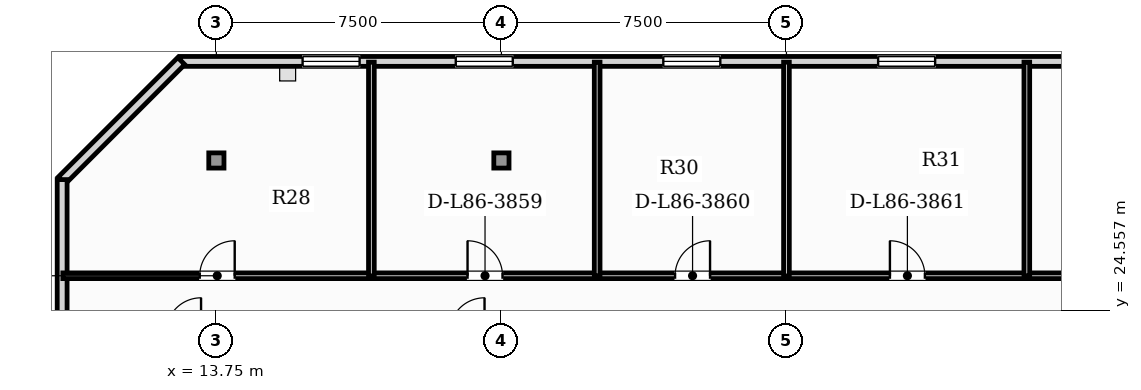
"""IFC4 building model, lengths in metres.
Left out: names, types, materials, properties, quantities, classifications, styles, units other than length and angle.
Written with IfcOpenShell. Run it as: python <this file> out.ifc"""

import sys

from ifc_helpers import new_model, si_unit, direction, frame, frame_2d, origin, origin_2d, place, context, subcontext, project, spatial, rectangle, hollow_rectangle, extrude, element, fill, save


model = new_model("IFC4")
c1 = context("Model", 3, precision=1e-05, world=origin(), true_north=direction((0.0, 1.0)))
c2 = subcontext(c1, "Body", "Model", "MODEL_VIEW")
j1 = project(units=[si_unit("LENGTHUNIT", "METRE"), si_unit("PLANEANGLEUNIT", "RADIAN")], contexts=[c1])
p1 = place(None, origin())
s1 = spatial("IfcSite", under=j1, at=p1, CompositionType="ELEMENT")
p2 = place(p1, origin())
s2 = spatial("IfcBuilding", under=s1, at=p2, CompositionType="ELEMENT")
p3 = place(p2, frame((0.0, 0.0, 349.05)))
s3 = spatial("IfcBuildingStorey", under=s2, at=p3, CompositionType="ELEMENT", Elevation=349.05)
for number, where, z_axis, x_axis in (
    (1, (13.75, 28.5, 0.0), (0.0, 0.0, 1.0), (1.0, 0.0, 0.0)),
    (2, (21.25, 28.5, 0.0), (0.0, 0.0, 1.0), (1.0, 0.0, 0.0)),
):
    element("IfcColumn", number, at=place(p3, frame(where, z_axis=z_axis, x_axis=x_axis)), inside=s3, PredefinedType="COLUMN", context=c2, shape_type="SweptSolid", body=[
        extrude(hollow_rectangle(XDim=0.4, YDim=0.4, WallThickness=0.02, at=origin_2d()), origin(), (0.0, 0.0, 1.0), 4.4),
    ])
p4 = place(p3, frame((44.698, 31.107, 0.0), z_axis=(0.0, 0.0, 1.0), x_axis=(-1.0, 0.0, 0.0)))
e3 = element("IfcWall", 3, at=p4, inside=s3, PredefinedType="SOLIDWALL", context=c2, shape_type="SweptSolid", body=[
    extrude(rectangle(XDim=31.896, YDim=0.26, at=frame_2d((15.948, 0.0))), origin(), (0.0, 0.0, 1.0), 4.14),
])
p5 = place(p4, frame((27.179, 0.0, 0.9)))
e4 = element("IfcOpeningElement", 4, at=p5, cuts=e3, PredefinedType="OPENING", context=c2, shape_type="SweptSolid", body=[
    extrude(rectangle(XDim=1.5, YDim=1.95, at=frame_2d((0.75, 0.975))), frame((0.0, 0.14, 0.0), z_axis=(0.0, -1.0, 0.0), x_axis=(1.0, 0.0, 0.0)), (0.0, 0.0, 1.0), 0.28),
])
p6 = place(p4, frame((23.149, 0.0, 0.9)))
e5 = element("IfcOpeningElement", 5, at=p6, cuts=e3, PredefinedType="OPENING", context=c2, shape_type="SweptSolid", body=[
    extrude(rectangle(XDim=1.5, YDim=1.95, at=frame_2d((0.75, 0.975))), frame((0.0, 0.14, 0.0), z_axis=(0.0, -1.0, 0.0), x_axis=(1.0, 0.0, 0.0)), (0.0, 0.0, 1.0), 0.28),
])
p7 = place(p4, frame((17.689, 0.0, 0.9)))
e6 = element("IfcOpeningElement", 6, at=p7, cuts=e3, PredefinedType="OPENING", context=c2, shape_type="SweptSolid", body=[
    extrude(rectangle(XDim=1.5, YDim=1.95, at=frame_2d((0.75, 0.975))), frame((0.0, 0.14, 0.0), z_axis=(0.0, -1.0, 0.0), x_axis=(1.0, 0.0, 0.0)), (0.0, 0.0, 1.0), 0.28),
])
p8 = place(p4, frame((12.036, 0.0, 0.9)))
e7 = element("IfcOpeningElement", 7, at=p8, cuts=e3, PredefinedType="OPENING", context=c2, shape_type="SweptSolid", body=[
    extrude(rectangle(XDim=1.5, YDim=1.95, at=frame_2d((0.75, 0.975))), frame((0.0, 0.14, 0.0), z_axis=(0.0, -1.0, 0.0), x_axis=(1.0, 0.0, 0.0)), (0.0, 0.0, 1.0), 0.28),
])
p9 = place(p4, frame((5.903, 0.0, 0.9)))
e8 = element("IfcOpeningElement", 8, at=p9, cuts=e3, PredefinedType="OPENING", context=c2, shape_type="SweptSolid", body=[
    extrude(rectangle(XDim=1.5, YDim=1.95, at=frame_2d((0.75, 0.975))), frame((0.0, 0.14, 0.0), z_axis=(0.0, -1.0, 0.0), x_axis=(1.0, 0.0, 0.0)), (0.0, 0.0, 1.0), 0.28),
])
p10 = place(p3, frame((12.825, 31.117, 0.0), z_axis=(0.0, 0.0, 1.0), x_axis=(-0.707106781187, -0.707106781187, 0.0)))
e9 = element("IfcWall", 9, at=p10, inside=s3, PredefinedType="SOLIDWALL", context=c2, shape_type="SweptSolid", body=[
    extrude(rectangle(XDim=4.445, YDim=0.26, at=frame_2d((2.223, 0.0))), origin(), (0.0, 0.0, 1.0), 4.14),
])
p11 = place(p3, frame((9.692, 27.997, 0.0), z_axis=(0.0, 0.0, 1.0), x_axis=(0.0, -1.0, 0.0)))
e10 = element("IfcWall", 10, at=p11, inside=s3, PredefinedType="SOLIDWALL", context=c2, shape_type="SweptSolid", body=[
    extrude(rectangle(XDim=24.757, YDim=0.26, at=frame_2d((12.378, 0.0))), origin(), (0.0, 0.0, 1.0), 4.14),
])
p12 = place(p11, frame((18.707, 0.0, 0.85)))
e11 = element("IfcOpeningElement", 11, at=p12, cuts=e10, PredefinedType="OPENING", context=c2, shape_type="SweptSolid", body=[
    extrude(rectangle(XDim=2.4, YDim=2.0, at=frame_2d((1.2, 1.0))), frame((0.0, 0.14, 0.0), z_axis=(0.0, -1.0, 0.0), x_axis=(1.0, 0.0, 0.0)), (0.0, 0.0, 1.0), 0.28),
])
p13 = place(p11, frame((10.273, 0.0, 0.9)))
e12 = element("IfcOpeningElement", 12, at=p13, cuts=e10, PredefinedType="OPENING", context=c2, shape_type="SweptSolid", body=[
    extrude(rectangle(XDim=1.5, YDim=1.95, at=frame_2d((0.75, 0.975))), frame((0.0, 0.14, 0.0), z_axis=(0.0, -1.0, 0.0), x_axis=(1.0, 0.0, 0.0)), (0.0, 0.0, 1.0), 0.28),
])
p14 = place(p11, frame((5.8, 0.0, 0.9)))
e13 = element("IfcOpeningElement", 13, at=p14, cuts=e10, PredefinedType="OPENING", context=c2, shape_type="SweptSolid", body=[
    extrude(rectangle(XDim=1.5, YDim=1.95, at=frame_2d((0.75, 0.975))), frame((0.0, 0.14, 0.0), z_axis=(0.0, -1.0, 0.0), x_axis=(1.0, 0.0, 0.0)), (0.0, 0.0, 1.0), 0.28),
])
p15 = place(p3, frame((9.711, 25.467, 0.0), z_axis=(0.0, 0.0, 1.0), x_axis=(1.0, 0.0, 0.0)))
e14 = element("IfcWall", 14, at=p15, inside=s3, PredefinedType="PARTITIONING", context=c2, shape_type="SweptSolid", body=[
    extrude(rectangle(XDim=8.122, YDim=0.15, at=frame_2d((4.061, 0.0))), origin(), (0.0, 0.0, 1.0), 4.14),
])
p16 = place(p15, frame((3.601, 0.0, 0.0)))
e15 = element("IfcOpeningElement", 15, at=p16, cuts=e14, PredefinedType="OPENING", context=c2, shape_type="SweptSolid", body=[
    extrude(rectangle(XDim=0.92, YDim=2.1, at=frame_2d((0.46, 1.05))), frame((0.0, 0.085, 0.0), z_axis=(0.0, -1.0, 0.0), x_axis=(1.0, 0.0, 0.0)), (0.0, 0.0, 1.0), 0.17),
])
p17 = place(p3, frame((17.864, 25.467, 0.0), z_axis=(0.0, 0.0, 1.0), x_axis=(1.0, 0.0, 0.0)))
e16 = element("IfcWall", 16, at=p17, inside=s3, PredefinedType="PARTITIONING", context=c2, shape_type="SweptSolid", body=[
    extrude(rectangle(XDim=5.911, YDim=0.15, at=frame_2d((2.956, 0.0))), origin(), (0.0, 0.0, 1.0), 4.14),
])
p18 = place(p17, frame((2.495, 0.0, 0.0)))
e17 = element("IfcOpeningElement", 17, at=p18, cuts=e16, PredefinedType="OPENING", context=c2, shape_type="SweptSolid", body=[
    extrude(rectangle(XDim=0.92, YDim=2.1, at=frame_2d((0.46, 1.05))), frame((0.0, 0.085, 0.0), z_axis=(0.0, -1.0, 0.0), x_axis=(1.0, 0.0, 0.0)), (0.0, 0.0, 1.0), 0.17),
])
p19 = place(p3, frame((23.804, 25.467, 0.0), z_axis=(0.0, 0.0, 1.0), x_axis=(1.0, 0.0, 0.0)))
e18 = element("IfcWall", 18, at=p19, inside=s3, PredefinedType="PARTITIONING", context=c2, shape_type="SweptSolid", body=[
    extrude(rectangle(XDim=4.951, YDim=0.15, at=frame_2d((2.475, 0.0))), origin(), (0.0, 0.0, 1.0), 4.14),
])
p20 = place(p19, frame((2.015, 0.0, 0.0)))
e19 = element("IfcOpeningElement", 19, at=p20, cuts=e18, PredefinedType="OPENING", context=c2, shape_type="SweptSolid", body=[
    extrude(rectangle(XDim=0.92, YDim=2.1, at=frame_2d((0.46, 1.05))), frame((0.0, 0.085, 0.0), z_axis=(0.0, -1.0, 0.0), x_axis=(1.0, 0.0, 0.0)), (0.0, 0.0, 1.0), 0.17),
])
p21 = place(p3, frame((28.785, 25.467, 0.0), z_axis=(0.0, 0.0, 1.0), x_axis=(1.0, 0.0, 0.0)))
e20 = element("IfcWall", 20, at=p21, inside=s3, PredefinedType="PARTITIONING", context=c2, shape_type="SweptSolid", body=[
    extrude(rectangle(XDim=6.295, YDim=0.15, at=frame_2d((3.147, 0.0))), origin(), (0.0, 0.0, 1.0), 4.14),
])
p22 = place(p21, frame((2.688, 0.0, 0.0)))
e21 = element("IfcOpeningElement", 21, at=p22, cuts=e20, PredefinedType="OPENING", context=c2, shape_type="SweptSolid", body=[
    extrude(rectangle(XDim=0.92, YDim=2.1, at=frame_2d((0.46, 1.05))), frame((0.0, 0.085, 0.0), z_axis=(0.0, -1.0, 0.0), x_axis=(1.0, 0.0, 0.0)), (0.0, 0.0, 1.0), 0.17),
])
p23 = place(p3, frame((35.11, 25.467, 0.0), z_axis=(0.0, 0.0, 1.0), x_axis=(1.0, 0.0, 0.0)))
e22 = element("IfcWall", 22, at=p23, inside=s3, PredefinedType="PARTITIONING", context=c2, shape_type="SweptSolid", body=[
    extrude(rectangle(XDim=5.911, YDim=0.15, at=frame_2d((2.955, 0.0))), origin(), (0.0, 0.0, 1.0), 4.14),
])
p24 = place(p23, frame((2.495, 0.0, 0.0)))
e23 = element("IfcOpeningElement", 23, at=p24, cuts=e22, PredefinedType="OPENING", context=c2, shape_type="SweptSolid", body=[
    extrude(rectangle(XDim=0.92, YDim=2.1, at=frame_2d((0.46, 1.05))), frame((0.0, 0.085, 0.0), z_axis=(0.0, -1.0, 0.0), x_axis=(1.0, 0.0, 0.0)), (0.0, 0.0, 1.0), 0.17),
])
for number, where, z_axis, x_axis in (
    (24, (17.829, 25.462, 0.0), (0.0, 0.0, 1.0), (0.0, 1.0, 0.0)),
    (25, (23.769, 25.462, 0.0), (0.0, 0.0, 1.0), (0.0, 1.0, 0.0)),
    (26, (28.75, 25.462, 0.0), (0.0, 0.0, 1.0), (0.0, 1.0, 0.0)),
    (27, (35.075, 25.462, 0.0), (0.0, 0.0, 1.0), (0.0, 1.0, 0.0)),
):
    element("IfcWall", number, at=place(p3, frame(where, z_axis=z_axis, x_axis=x_axis)), inside=s3, PredefinedType="PARTITIONING", context=c2, shape_type="SweptSolid", body=[
        extrude(rectangle(XDim=5.625, YDim=0.15, at=frame_2d((2.813, 0.0))), origin(), (0.0, 0.0, 1.0), 4.14),
    ])
p25 = place(p5, origin())
e28 = element("IfcWindow", 28, at=p25, inside=s3, PartitioningType="SINGLE_PANEL", PredefinedType="WINDOW", context=c2, shape_type="SweptSolid", body=[
    extrude(rectangle(XDim=1.5, YDim=1.95, at=frame_2d((0.75, 0.975))), frame((0.0, 0.03, 0.0), z_axis=(0.0, -1.0, 0.0), x_axis=(1.0, 0.0, 0.0)), (0.0, 0.0, 1.0), 0.06),
])
fill(e4, e28)
p26 = place(p6, origin())
e29 = element("IfcWindow", 29, at=p26, inside=s3, PartitioningType="SINGLE_PANEL", PredefinedType="WINDOW", context=c2, shape_type="SweptSolid", body=[
    extrude(rectangle(XDim=1.5, YDim=1.95, at=frame_2d((0.75, 0.975))), frame((0.0, 0.03, 0.0), z_axis=(0.0, -1.0, 0.0), x_axis=(1.0, 0.0, 0.0)), (0.0, 0.0, 1.0), 0.06),
])
fill(e5, e29)
p27 = place(p7, origin())
e30 = element("IfcWindow", 30, at=p27, inside=s3, PartitioningType="SINGLE_PANEL", PredefinedType="WINDOW", context=c2, shape_type="SweptSolid", body=[
    extrude(rectangle(XDim=1.5, YDim=1.95, at=frame_2d((0.75, 0.975))), frame((0.0, 0.03, 0.0), z_axis=(0.0, -1.0, 0.0), x_axis=(1.0, 0.0, 0.0)), (0.0, 0.0, 1.0), 0.06),
])
fill(e6, e30)
p28 = place(p8, origin())
e31 = element("IfcWindow", 31, at=p28, inside=s3, PartitioningType="SINGLE_PANEL", PredefinedType="WINDOW", context=c2, shape_type="SweptSolid", body=[
    extrude(rectangle(XDim=1.5, YDim=1.95, at=frame_2d((0.75, 0.975))), frame((0.0, 0.03, 0.0), z_axis=(0.0, -1.0, 0.0), x_axis=(1.0, 0.0, 0.0)), (0.0, 0.0, 1.0), 0.06),
])
fill(e7, e31)
p29 = place(p16, origin())
e32 = element("IfcDoor", 32, at=p29, inside=s3, OperationType="SINGLE_SWING_RIGHT", PredefinedType="DOOR", context=c2, shape_type="SweptSolid", body=[
    extrude(rectangle(XDim=0.92, YDim=2.1, at=frame_2d((0.46, 1.05))), frame((0.0, 0.025, 0.0), z_axis=(0.0, -1.0, 0.0), x_axis=(1.0, 0.0, 0.0)), (0.0, 0.0, 1.0), 0.05),
])
fill(e15, e32)
p30 = place(p18, origin())
e33 = element("IfcDoor", 33, at=p30, inside=s3, OperationType="SINGLE_SWING_LEFT", PredefinedType="DOOR", context=c2, shape_type="SweptSolid", body=[
    extrude(rectangle(XDim=0.92, YDim=2.1, at=frame_2d((0.46, 1.05))), frame((0.0, 0.025, 0.0), z_axis=(0.0, -1.0, 0.0), x_axis=(1.0, 0.0, 0.0)), (0.0, 0.0, 1.0), 0.05),
])
fill(e17, e33)
p31 = place(p20, origin())
e34 = element("IfcDoor", 34, at=p31, inside=s3, OperationType="SINGLE_SWING_RIGHT", PredefinedType="DOOR", context=c2, shape_type="SweptSolid", body=[
    extrude(rectangle(XDim=0.92, YDim=2.1, at=frame_2d((0.46, 1.05))), frame((0.0, 0.025, 0.0), z_axis=(0.0, -1.0, 0.0), x_axis=(1.0, 0.0, 0.0)), (0.0, 0.0, 1.0), 0.05),
])
fill(e19, e34)
p32 = place(p22, origin())
e35 = element("IfcDoor", 35, at=p32, inside=s3, OperationType="SINGLE_SWING_LEFT", PredefinedType="DOOR", context=c2, shape_type="SweptSolid", body=[
    extrude(rectangle(XDim=0.92, YDim=2.1, at=frame_2d((0.46, 1.05))), frame((0.0, 0.025, 0.0), z_axis=(0.0, -1.0, 0.0), x_axis=(1.0, 0.0, 0.0)), (0.0, 0.0, 1.0), 0.05),
])
fill(e21, e35)
save(model, sys.argv[1])
